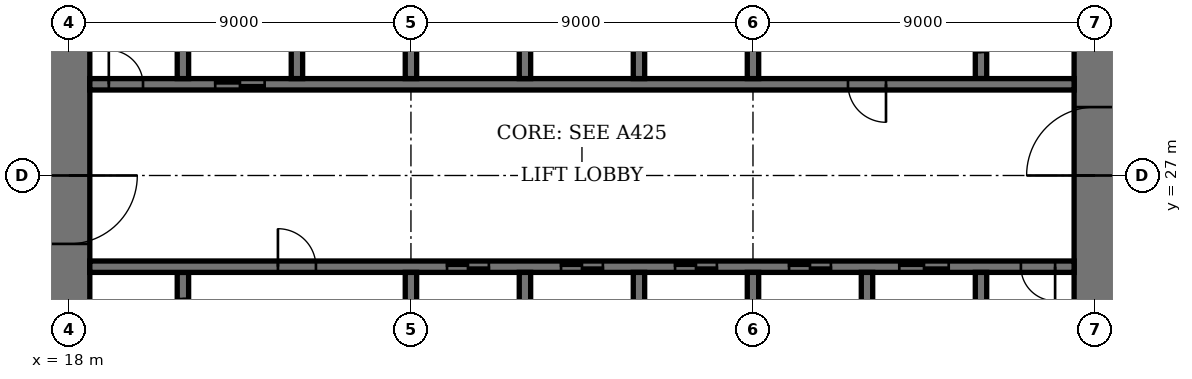
"""IFC4 building model, lengths in metres.
Left out: names, types, materials, properties, quantities, classifications, styles, units other than length and angle.
Written with IfcOpenShell. Run it as: python <this file> out.ifc"""

import sys

from ifc_helpers import new_model, si_unit, direction, frame, frame_2d, origin, place, context, subcontext, project, spatial, rectangle, extrude, element, fill, save


model = new_model("IFC4")
c1 = context("Model", 3, precision=1e-05, world=origin(), true_north=direction((0.0, 1.0)))
c2 = subcontext(c1, "Body", "Model", "MODEL_VIEW")
j1 = project(units=[si_unit("LENGTHUNIT", "METRE"), si_unit("PLANEANGLEUNIT", "RADIAN")], contexts=[c1])
p1 = place(None, origin())
s1 = spatial("IfcSite", under=j1, at=p1, CompositionType="ELEMENT")
p2 = place(p1, origin())
s2 = spatial("IfcBuilding", under=s1, at=p2, CompositionType="ELEMENT")
p3 = place(p2, frame((0.0, 0.0, 15.8)))
s3 = spatial("IfcBuildingStorey", under=s2, at=p3, CompositionType="ELEMENT", Elevation=15.8)
p4 = place(p3, frame((18.0, 35.45, 0.0), z_axis=(0.0, 0.0, 1.0), x_axis=(0.0, -1.0, 0.0)))
e1 = element("IfcWall", 1, at=p4, inside=s3, PredefinedType="SHEAR", context=c2, shape_type="SweptSolid", body=[
    extrude(rectangle(XDim=16.9, YDim=1.1, at=frame_2d((8.45, 0.0))), origin(), (0.0, 0.0, 1.0), 4.0),
])
p5 = place(p4, frame((8.45, 0.0, 0.0)))
e2 = element("IfcOpeningElement", 2, at=p5, cuts=e1, PredefinedType="OPENING", context=c2, shape_type="SweptSolid", body=[
    extrude(rectangle(XDim=1.8, YDim=2.4, at=frame_2d((0.9, 1.2))), frame((0.0, 0.56, 0.0), z_axis=(0.0, -1.0, 0.0), x_axis=(1.0, 0.0, 0.0)), (0.0, 0.0, 1.0), 1.12),
])
p6 = place(p3, frame((45.0, 18.55, 0.0), z_axis=(0.0, 0.0, 1.0), x_axis=(0.0, 1.0, 0.0)))
e3 = element("IfcWall", 3, at=p6, inside=s3, PredefinedType="SHEAR", context=c2, shape_type="SweptSolid", body=[
    extrude(rectangle(XDim=16.9, YDim=1.1, at=frame_2d((8.45, 0.0))), origin(), (0.0, 0.0, 1.0), 4.0),
])
p7 = place(p6, frame((8.45, 0.0, 0.0)))
e4 = element("IfcOpeningElement", 4, at=p7, cuts=e3, PredefinedType="OPENING", context=c2, shape_type="SweptSolid", body=[
    extrude(rectangle(XDim=1.8, YDim=2.4, at=frame_2d((0.9, 1.2))), frame((0.0, 0.56, 0.0), z_axis=(0.0, -1.0, 0.0), x_axis=(1.0, 0.0, 0.0)), (0.0, 0.0, 1.0), 1.12),
])
p8 = place(p3, frame((21.0, 21.95, 0.0), z_axis=(0.0, 0.0, 1.0), x_axis=(0.0, 1.0, 0.0)))
e5 = element("IfcWall", 5, at=p8, inside=s3, PredefinedType="SHEAR", context=c2, shape_type="SweptSolid", body=[
    extrude(rectangle(XDim=2.5, YDim=0.3, at=frame_2d((1.25, 0.0))), origin(), (0.0, 0.0, 1.0), 4.0),
])
p9 = place(p8, frame((0.7, 0.0, 0.0)))
e6 = element("IfcOpeningElement", 6, at=p9, cuts=e5, PredefinedType="OPENING", context=c2, shape_type="SweptSolid", body=[
    extrude(rectangle(XDim=1.1, YDim=2.4, at=frame_2d((0.55, 1.2))), frame((0.0, 0.16, 0.0), z_axis=(0.0, -1.0, 0.0), x_axis=(1.0, 0.0, 0.0)), (0.0, 0.0, 1.0), 0.32),
])
p10 = place(p3, frame((42.0, 29.55, 0.0), z_axis=(0.0, 0.0, 1.0), x_axis=(0.0, 1.0, 0.0)))
e7 = element("IfcWall", 7, at=p10, inside=s3, PredefinedType="SHEAR", context=c2, shape_type="SweptSolid", body=[
    extrude(rectangle(XDim=2.5, YDim=0.3, at=frame_2d((1.25, 0.0))), origin(), (0.0, 0.0, 1.0), 4.0),
])
p11 = place(p10, frame((0.7, 0.0, 0.0)))
e8 = element("IfcOpeningElement", 8, at=p11, cuts=e7, PredefinedType="OPENING", context=c2, shape_type="SweptSolid", body=[
    extrude(rectangle(XDim=1.1, YDim=2.4, at=frame_2d((0.55, 1.2))), frame((0.0, 0.16, 0.0), z_axis=(0.0, -1.0, 0.0), x_axis=(1.0, 0.0, 0.0)), (0.0, 0.0, 1.0), 0.32),
])
p12 = place(p3, frame((18.55, 24.6, 0.0), z_axis=(0.0, 0.0, 1.0), x_axis=(1.0, 0.0, 0.0)))
e9 = element("IfcWall", 9, at=p12, inside=s3, PredefinedType="SHEAR", context=c2, shape_type="SweptSolid", body=[
    extrude(rectangle(XDim=25.9, YDim=0.3, at=frame_2d((12.95, 0.0))), origin(), (0.0, 0.0, 1.0), 4.0),
])
p13 = place(p12, frame((4.95, 0.0, 0.0)))
e10 = element("IfcOpeningElement", 10, at=p13, cuts=e9, PredefinedType="OPENING", context=c2, shape_type="SweptSolid", body=[
    extrude(rectangle(XDim=1.0, YDim=2.4, at=frame_2d((0.5, 1.2))), frame((0.0, 0.16, 0.0), z_axis=(0.0, -1.0, 0.0), x_axis=(1.0, 0.0, 0.0)), (0.0, 0.0, 1.0), 0.32),
])
p14 = place(p12, frame((24.5, 0.0, 0.0)))
e11 = element("IfcOpeningElement", 11, at=p14, cuts=e9, PredefinedType="OPENING", context=c2, shape_type="SweptSolid", body=[
    extrude(rectangle(XDim=0.9, YDim=2.1, at=frame_2d((0.45, 1.05))), frame((0.0, 0.16, 0.0), z_axis=(0.0, -1.0, 0.0), x_axis=(1.0, 0.0, 0.0)), (0.0, 0.0, 1.0), 0.32),
])
p15 = place(p12, frame((9.4, 0.0, 0.0)))
e12 = element("IfcOpeningElement", 12, at=p15, cuts=e9, PredefinedType="OPENING", context=c2, shape_type="SweptSolid", body=[
    extrude(rectangle(XDim=1.1, YDim=2.4, at=frame_2d((0.55, 1.2))), frame((0.0, 0.16, 0.0), z_axis=(0.0, -1.0, 0.0), x_axis=(1.0, 0.0, 0.0)), (0.0, 0.0, 1.0), 0.32),
])
p16 = place(p12, frame((12.4, 0.0, 0.0)))
e13 = element("IfcOpeningElement", 13, at=p16, cuts=e9, PredefinedType="OPENING", context=c2, shape_type="SweptSolid", body=[
    extrude(rectangle(XDim=1.1, YDim=2.4, at=frame_2d((0.55, 1.2))), frame((0.0, 0.16, 0.0), z_axis=(0.0, -1.0, 0.0), x_axis=(1.0, 0.0, 0.0)), (0.0, 0.0, 1.0), 0.32),
])
p17 = place(p12, frame((15.4, 0.0, 0.0)))
e14 = element("IfcOpeningElement", 14, at=p17, cuts=e9, PredefinedType="OPENING", context=c2, shape_type="SweptSolid", body=[
    extrude(rectangle(XDim=1.1, YDim=2.4, at=frame_2d((0.55, 1.2))), frame((0.0, 0.16, 0.0), z_axis=(0.0, -1.0, 0.0), x_axis=(1.0, 0.0, 0.0)), (0.0, 0.0, 1.0), 0.32),
])
p18 = place(p12, frame((18.4, 0.0, 0.0)))
e15 = element("IfcOpeningElement", 15, at=p18, cuts=e9, PredefinedType="OPENING", context=c2, shape_type="SweptSolid", body=[
    extrude(rectangle(XDim=1.1, YDim=2.4, at=frame_2d((0.55, 1.2))), frame((0.0, 0.16, 0.0), z_axis=(0.0, -1.0, 0.0), x_axis=(1.0, 0.0, 0.0)), (0.0, 0.0, 1.0), 0.32),
])
p19 = place(p12, frame((21.3, 0.0, 0.0)))
e16 = element("IfcOpeningElement", 16, at=p19, cuts=e9, PredefinedType="OPENING", context=c2, shape_type="SweptSolid", body=[
    extrude(rectangle(XDim=1.3, YDim=2.4, at=frame_2d((0.65, 1.2))), frame((0.0, 0.16, 0.0), z_axis=(0.0, -1.0, 0.0), x_axis=(1.0, 0.0, 0.0)), (0.0, 0.0, 1.0), 0.32),
])
p20 = place(p3, frame((18.55, 29.4, 0.0), z_axis=(0.0, 0.0, 1.0), x_axis=(1.0, 0.0, 0.0)))
e17 = element("IfcWall", 17, at=p20, inside=s3, PredefinedType="SHEAR", context=c2, shape_type="SweptSolid", body=[
    extrude(rectangle(XDim=25.9, YDim=0.3, at=frame_2d((12.95, 0.0))), origin(), (0.0, 0.0, 1.0), 4.0),
])
p21 = place(p20, frame((19.95, 0.0, 0.0)))
e18 = element("IfcOpeningElement", 18, at=p21, cuts=e17, PredefinedType="OPENING", context=c2, shape_type="SweptSolid", body=[
    extrude(rectangle(XDim=1.0, YDim=2.4, at=frame_2d((0.5, 1.2))), frame((0.0, 0.16, 0.0), z_axis=(0.0, -1.0, 0.0), x_axis=(1.0, 0.0, 0.0)), (0.0, 0.0, 1.0), 0.32),
])
p22 = place(p20, frame((0.5, 0.0, 0.0)))
e19 = element("IfcOpeningElement", 19, at=p22, cuts=e17, PredefinedType="OPENING", context=c2, shape_type="SweptSolid", body=[
    extrude(rectangle(XDim=0.9, YDim=2.1, at=frame_2d((0.45, 1.05))), frame((0.0, 0.16, 0.0), z_axis=(0.0, -1.0, 0.0), x_axis=(1.0, 0.0, 0.0)), (0.0, 0.0, 1.0), 0.32),
])
p23 = place(p20, frame((3.3, 0.0, 0.0)))
e20 = element("IfcOpeningElement", 20, at=p23, cuts=e17, PredefinedType="OPENING", context=c2, shape_type="SweptSolid", body=[
    extrude(rectangle(XDim=1.3, YDim=2.4, at=frame_2d((0.65, 1.2))), frame((0.0, 0.16, 0.0), z_axis=(0.0, -1.0, 0.0), x_axis=(1.0, 0.0, 0.0)), (0.0, 0.0, 1.0), 0.32),
])
for number, where, z_axis, x_axis in (
    (21, (30.0, 21.75, 0.0), (0.0, 0.0, 1.0), (0.0, 1.0, 0.0)),
    (22, (33.0, 29.55, 0.0), (0.0, 0.0, 1.0), (0.0, 1.0, 0.0)),
    (23, (33.0, 21.75, 0.0), (0.0, 0.0, 1.0), (0.0, 1.0, 0.0)),
    (24, (30.0, 29.55, 0.0), (0.0, 0.0, 1.0), (0.0, 1.0, 0.0)),
    (25, (36.0, 21.75, 0.0), (0.0, 0.0, 1.0), (0.0, 1.0, 0.0)),
    (26, (27.0, 29.55, 0.0), (0.0, 0.0, 1.0), (0.0, 1.0, 0.0)),
):
    element("IfcWall", number, at=place(p3, frame(where, z_axis=z_axis, x_axis=x_axis)), inside=s3, PredefinedType="SHEAR", context=c2, shape_type="SweptSolid", body=[
        extrude(rectangle(XDim=2.7, YDim=0.3, at=frame_2d((1.35, 0.0))), origin(), (0.0, 0.0, 1.0), 4.0),
    ])
for number, where, z_axis, x_axis in (
    (27, (39.0, 18.55, 0.0), (0.0, 0.0, 1.0), (0.0, 1.0, 0.0)),
    (28, (24.0, 29.55, 0.0), (0.0, 0.0, 1.0), (0.0, 1.0, 0.0)),
):
    element("IfcWall", number, at=place(p3, frame(where, z_axis=z_axis, x_axis=x_axis)), inside=s3, PredefinedType="SHEAR", context=c2, shape_type="SweptSolid", body=[
        extrude(rectangle(XDim=5.9, YDim=0.3, at=frame_2d((2.95, 0.0))), origin(), (0.0, 0.0, 1.0), 4.0),
    ])
for number, where, z_axis, x_axis in (
    (29, (42.0, 21.75, 0.0), (0.0, 0.0, 1.0), (0.0, 1.0, 0.0)),
    (30, (21.0, 29.55, 0.0), (0.0, 0.0, 1.0), (0.0, 1.0, 0.0)),
):
    element("IfcWall", number, at=place(p3, frame(where, z_axis=z_axis, x_axis=x_axis)), inside=s3, PredefinedType="SHEAR", context=c2, shape_type="SweptSolid", body=[
        extrude(rectangle(XDim=2.7, YDim=0.3, at=frame_2d((1.35, 0.0))), origin(), (0.0, 0.0, 1.0), 4.0),
    ])
for number, where, z_axis, x_axis in (
    (31, (27.0, 21.6, 0.0), (0.0, 0.0, 1.0), (0.0, 1.0, 0.0)),
    (32, (36.0, 29.55, 0.0), (0.0, 0.0, 1.0), (0.0, 1.0, 0.0)),
):
    element("IfcWall", number, at=place(p3, frame(where, z_axis=z_axis, x_axis=x_axis)), inside=s3, PredefinedType="SHEAR", context=c2, shape_type="SweptSolid", body=[
        extrude(rectangle(XDim=2.85, YDim=0.3, at=frame_2d((1.425, 0.0))), origin(), (0.0, 0.0, 1.0), 4.0),
    ])
p24 = place(p5, origin())
e33 = element("IfcDoor", 33, at=p24, inside=s3, OperationType="DOUBLE_DOOR_DOUBLE_SWING", PredefinedType="DOOR", context=c2, shape_type="SweptSolid", body=[
    extrude(rectangle(XDim=1.8, YDim=2.4, at=frame_2d((0.9, 1.2))), frame((0.0, 0.03, 0.0), z_axis=(0.0, -1.0, 0.0), x_axis=(1.0, 0.0, 0.0)), (0.0, 0.0, 1.0), 0.06),
    extrude(rectangle(XDim=0.04, YDim=2.4, at=frame_2d((0.02, 1.2))), frame((0.0, 0.55, 0.0), z_axis=(0.0, -1.0, 0.0), x_axis=(1.0, 0.0, 0.0)), (0.0, 0.0, 1.0), 1.1),
    extrude(rectangle(XDim=0.04, YDim=2.4, at=frame_2d((1.78, 1.2))), frame((0.0, 0.55, 0.0), z_axis=(0.0, -1.0, 0.0), x_axis=(1.0, 0.0, 0.0)), (0.0, 0.0, 1.0), 1.1),
    extrude(rectangle(XDim=1.8, YDim=0.04, at=frame_2d((0.9, 2.38))), frame((0.0, 0.55, 0.0), z_axis=(0.0, -1.0, 0.0), x_axis=(1.0, 0.0, 0.0)), (0.0, 0.0, 1.0), 1.1),
])
fill(e2, e33)
p25 = place(p7, origin())
e34 = element("IfcDoor", 34, at=p25, inside=s3, OperationType="DOUBLE_DOOR_DOUBLE_SWING", PredefinedType="DOOR", context=c2, shape_type="SweptSolid", body=[
    extrude(rectangle(XDim=1.8, YDim=2.4, at=frame_2d((0.9, 1.2))), frame((0.0, 0.03, 0.0), z_axis=(0.0, -1.0, 0.0), x_axis=(1.0, 0.0, 0.0)), (0.0, 0.0, 1.0), 0.06),
    extrude(rectangle(XDim=0.04, YDim=2.4, at=frame_2d((0.02, 1.2))), frame((0.0, 0.55, 0.0), z_axis=(0.0, -1.0, 0.0), x_axis=(1.0, 0.0, 0.0)), (0.0, 0.0, 1.0), 1.1),
    extrude(rectangle(XDim=0.04, YDim=2.4, at=frame_2d((1.78, 1.2))), frame((0.0, 0.55, 0.0), z_axis=(0.0, -1.0, 0.0), x_axis=(1.0, 0.0, 0.0)), (0.0, 0.0, 1.0), 1.1),
    extrude(rectangle(XDim=1.8, YDim=0.04, at=frame_2d((0.9, 2.38))), frame((0.0, 0.55, 0.0), z_axis=(0.0, -1.0, 0.0), x_axis=(1.0, 0.0, 0.0)), (0.0, 0.0, 1.0), 1.1),
])
fill(e4, e34)
p26 = place(p13, origin())
e35 = element("IfcDoor", 35, at=p26, inside=s3, OperationType="SINGLE_SWING_RIGHT", PredefinedType="DOOR", context=c2, shape_type="SweptSolid", body=[
    extrude(rectangle(XDim=1.0, YDim=2.4, at=frame_2d((0.5, 1.2))), frame((0.0, 0.03, 0.0), z_axis=(0.0, -1.0, 0.0), x_axis=(1.0, 0.0, 0.0)), (0.0, 0.0, 1.0), 0.06),
])
fill(e10, e35)
p27 = place(p21, origin())
e36 = element("IfcDoor", 36, at=p27, inside=s3, OperationType="SINGLE_SWING_RIGHT", PredefinedType="DOOR", context=c2, shape_type="SweptSolid", body=[
    extrude(rectangle(XDim=1.0, YDim=2.4, at=frame_2d((0.5, 1.2))), frame((0.0, 0.03, 0.0), z_axis=(0.0, -1.0, 0.0), x_axis=(1.0, 0.0, 0.0)), (0.0, 0.0, 1.0), 0.06),
])
fill(e18, e36)
p28 = place(p14, origin())
e37 = element("IfcDoor", 37, at=p28, inside=s3, OperationType="SINGLE_SWING_RIGHT", PredefinedType="DOOR", context=c2, shape_type="SweptSolid", body=[
    extrude(rectangle(XDim=0.9, YDim=2.1, at=frame_2d((0.45, 1.05))), frame((0.0, 0.03, 0.0), z_axis=(0.0, -1.0, 0.0), x_axis=(1.0, 0.0, 0.0)), (0.0, 0.0, 1.0), 0.06),
])
fill(e11, e37)
p29 = place(p22, origin())
e38 = element("IfcDoor", 38, at=p29, inside=s3, OperationType="SINGLE_SWING_RIGHT", PredefinedType="DOOR", context=c2, shape_type="SweptSolid", body=[
    extrude(rectangle(XDim=0.9, YDim=2.1, at=frame_2d((0.45, 1.05))), frame((0.0, 0.03, 0.0), z_axis=(0.0, -1.0, 0.0), x_axis=(1.0, 0.0, 0.0)), (0.0, 0.0, 1.0), 0.06),
])
fill(e19, e38)
p30 = place(p15, origin())
e39 = element("IfcDoor", 39, at=p30, inside=s3, OperationType="DOUBLE_DOOR_SLIDING", PredefinedType="DOOR", context=c2, shape_type="SweptSolid", body=[
    extrude(rectangle(XDim=1.1, YDim=2.4, at=frame_2d((0.55, 1.2))), frame((0.0, 0.02, 0.0), z_axis=(0.0, -1.0, 0.0), x_axis=(1.0, 0.0, 0.0)), (0.0, 0.0, 1.0), 0.04),
])
fill(e12, e39)
p31 = place(p16, origin())
e40 = element("IfcDoor", 40, at=p31, inside=s3, OperationType="DOUBLE_DOOR_SLIDING", PredefinedType="DOOR", context=c2, shape_type="SweptSolid", body=[
    extrude(rectangle(XDim=1.1, YDim=2.4, at=frame_2d((0.55, 1.2))), frame((0.0, 0.02, 0.0), z_axis=(0.0, -1.0, 0.0), x_axis=(1.0, 0.0, 0.0)), (0.0, 0.0, 1.0), 0.04),
])
fill(e13, e40)
p32 = place(p17, origin())
e41 = element("IfcDoor", 41, at=p32, inside=s3, OperationType="DOUBLE_DOOR_SLIDING", PredefinedType="DOOR", context=c2, shape_type="SweptSolid", body=[
    extrude(rectangle(XDim=1.1, YDim=2.4, at=frame_2d((0.55, 1.2))), frame((0.0, 0.02, 0.0), z_axis=(0.0, -1.0, 0.0), x_axis=(1.0, 0.0, 0.0)), (0.0, 0.0, 1.0), 0.04),
])
fill(e14, e41)
p33 = place(p18, origin())
e42 = element("IfcDoor", 42, at=p33, inside=s3, OperationType="DOUBLE_DOOR_SLIDING", PredefinedType="DOOR", context=c2, shape_type="SweptSolid", body=[
    extrude(rectangle(XDim=1.1, YDim=2.4, at=frame_2d((0.55, 1.2))), frame((0.0, 0.02, 0.0), z_axis=(0.0, -1.0, 0.0), x_axis=(1.0, 0.0, 0.0)), (0.0, 0.0, 1.0), 0.04),
])
fill(e15, e42)
p34 = place(p19, origin())
e43 = element("IfcDoor", 43, at=p34, inside=s3, OperationType="DOUBLE_DOOR_SLIDING", PredefinedType="DOOR", context=c2, shape_type="SweptSolid", body=[
    extrude(rectangle(XDim=1.3, YDim=2.4, at=frame_2d((0.65, 1.2))), frame((0.0, 0.02, 0.0), z_axis=(0.0, -1.0, 0.0), x_axis=(1.0, 0.0, 0.0)), (0.0, 0.0, 1.0), 0.04),
])
fill(e16, e43)
p35 = place(p23, origin())
e44 = element("IfcDoor", 44, at=p35, inside=s3, OperationType="DOUBLE_DOOR_SLIDING", PredefinedType="DOOR", context=c2, shape_type="SweptSolid", body=[
    extrude(rectangle(XDim=1.3, YDim=2.4, at=frame_2d((0.65, 1.2))), frame((0.0, 0.02, 0.0), z_axis=(0.0, -1.0, 0.0), x_axis=(1.0, 0.0, 0.0)), (0.0, 0.0, 1.0), 0.04),
])
fill(e20, e44)
save(model, sys.argv[1])
